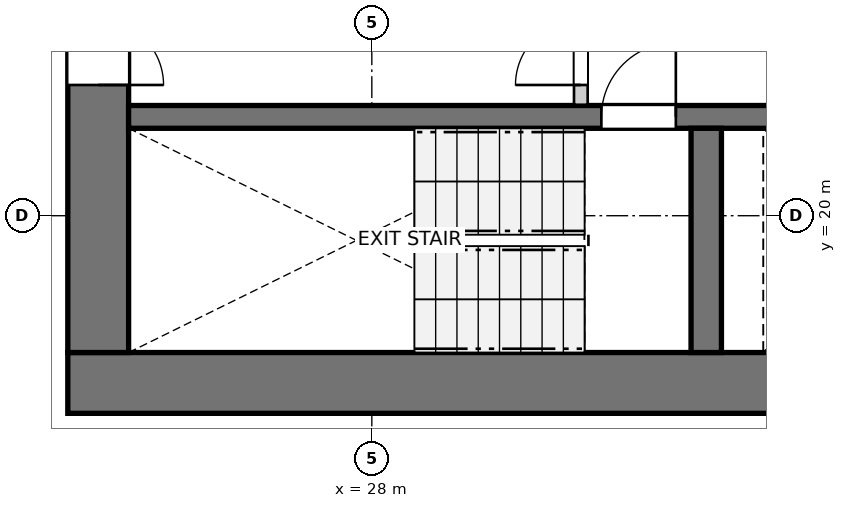
"""IFC4 building model, lengths in metres.
Left out: names, types, materials, properties, quantities, classifications, styles, units other than length and angle.
Written with IfcOpenShell. Run it as: python <this file> out.ifc"""

import sys

from ifc_helpers import new_model, si_unit, direction, frame, frame_2d, origin, place, context, subcontext, project, spatial, rectangle, extrude, source, transform, mapped, element, fill, save


model = new_model("IFC4")
c1 = context("Model", 3, precision=1e-05, world=origin(), true_north=direction((0.0, 1.0)))
c2 = subcontext(c1, "Body", "Model", "MODEL_VIEW")
j1 = project(units=[si_unit("LENGTHUNIT", "METRE"), si_unit("PLANEANGLEUNIT", "RADIAN")], contexts=[c1])
p1 = place(None, origin())
s1 = spatial("IfcSite", under=j1, at=p1, CompositionType="ELEMENT")
p2 = place(p1, origin())
s2 = spatial("IfcBuilding", under=s1, at=p2, CompositionType="ELEMENT")
p3 = place(p2, frame((0.0, 0.0, 14.2)))
s3 = spatial("IfcBuildingStorey", under=s2, at=p3, CompositionType="ELEMENT", Elevation=14.2)
p4 = place(p3, frame((24.0, 17.8, 0.0), z_axis=(0.0, 0.0, 1.0), x_axis=(1.0, 0.0, 0.0)))
e1 = element("IfcWall", 1, at=p4, inside=s3, PredefinedType="SHEAR", context=c2, shape_type="SweptSolid", body=[
    extrude(rectangle(XDim=12.7, YDim=0.8, at=frame_2d((6.35, 0.0))), origin(), (0.0, 0.0, 1.0), 2.94),
])
p5 = place(p3, frame((24.4, 33.8, 0.0), z_axis=(0.0, 0.0, 1.0), x_axis=(0.0, -1.0, 0.0)))
e2 = element("IfcWall", 2, at=p5, inside=s3, PredefinedType="SHEAR", context=c2, shape_type="SweptSolid", body=[
    extrude(rectangle(XDim=15.6, YDim=0.8, at=frame_2d((7.8, 0.0))), origin(), (0.0, 0.0, 1.0), 2.94),
])
p6 = place(p5, frame((7.05, 0.0, 0.0)))
e3 = element("IfcOpeningElement", 3, at=p6, cuts=e2, PredefinedType="OPENING", context=c2, shape_type="SweptSolid", body=[
    extrude(rectangle(XDim=1.5, YDim=2.15, at=frame_2d((0.75, 1.075))), frame((0.0, 0.41, 0.0), z_axis=(0.0, -1.0, 0.0), x_axis=(1.0, 0.0, 0.0)), (0.0, 0.0, 1.0), 0.82),
])
p7 = place(p5, frame((3.52, 0.0, 0.0)))
e4 = element("IfcOpeningElement", 4, at=p7, cuts=e2, PredefinedType="OPENING", context=c2, shape_type="SweptSolid", body=[
    extrude(rectangle(XDim=0.86, YDim=2.05, at=frame_2d((0.43, 1.025))), frame((0.0, 0.41, 0.0), z_axis=(0.0, -1.0, 0.0), x_axis=(1.0, 0.0, 0.0)), (0.0, 0.0, 1.0), 0.82),
])
p8 = place(p5, frame((11.22, 0.0, 0.0)))
e5 = element("IfcOpeningElement", 5, at=p8, cuts=e2, PredefinedType="OPENING", context=c2, shape_type="SweptSolid", body=[
    extrude(rectangle(XDim=0.86, YDim=2.05, at=frame_2d((0.43, 1.025))), frame((0.0, 0.41, 0.0), z_axis=(0.0, -1.0, 0.0), x_axis=(1.0, 0.0, 0.0)), (0.0, 0.0, 1.0), 0.82),
])
p9 = place(p3, frame((24.8, 21.3, 0.0), z_axis=(0.0, 0.0, 1.0), x_axis=(1.0, 0.0, 0.0)))
e6 = element("IfcWall", 6, at=p9, inside=s3, PredefinedType="SHEAR", context=c2, shape_type="SweptSolid", body=[
    extrude(rectangle(XDim=11.1, YDim=0.3, at=frame_2d((5.55, 0.0))), origin(), (0.0, 0.0, 1.0), 2.94),
])
p10 = place(p9, frame((6.22, 0.0, 0.0)))
e7 = element("IfcOpeningElement", 7, at=p10, cuts=e6, PredefinedType="OPENING", context=c2, shape_type="SweptSolid", body=[
    extrude(rectangle(XDim=0.98, YDim=2.15, at=frame_2d((0.49, 1.075))), frame((0.0, 0.16, 0.0), z_axis=(0.0, -1.0, 0.0), x_axis=(1.0, 0.0, 0.0)), (0.0, 0.0, 1.0), 0.32),
])
p11 = place(p9, frame((9.15, 0.0, 0.0)))
e8 = element("IfcOpeningElement", 8, at=p11, cuts=e6, PredefinedType="OPENING", context=c2, shape_type="SweptSolid", body=[
    extrude(rectangle(XDim=1.15, YDim=2.15, at=frame_2d((0.575, 1.075))), frame((0.0, 0.16, 0.0), z_axis=(0.0, -1.0, 0.0), x_axis=(1.0, 0.0, 0.0)), (0.0, 0.0, 1.0), 0.32),
])
p12 = place(p3, frame((32.4, 18.2, 0.0), z_axis=(0.0, 0.0, 1.0), x_axis=(0.0, 1.0, 0.0)))
e9 = element("IfcWall", 9, at=p12, inside=s3, PredefinedType="SHEAR", context=c2, shape_type="SweptSolid", body=[
    extrude(rectangle(XDim=2.95, YDim=0.4, at=frame_2d((1.475, 0.0))), origin(), (0.0, 0.0, 1.0), 2.94),
])
p13 = place(p3, frame((30.75, 21.46, 0.0), z_axis=(0.0, 0.0, 1.0), x_axis=(0.0, 1.0, 0.0)))
e10 = element("IfcWall", 10, at=p13, inside=s3, PredefinedType="PARTITIONING", context=c2, shape_type="SweptSolid", body=[
    extrude(rectangle(XDim=3.11, YDim=0.18, at=frame_2d((1.555, 0.0))), origin(), (0.0, 0.0, 1.0), 2.94),
])
p14 = place(p13, frame((0.26, 0.0, 0.0)))
e11 = element("IfcOpeningElement", 11, at=p14, cuts=e10, PredefinedType="OPENING", context=c2, shape_type="SweptSolid", body=[
    extrude(rectangle(XDim=0.86, YDim=2.05, at=frame_2d((0.43, 1.025))), frame((0.0, 0.1, 0.0), z_axis=(0.0, -1.0, 0.0), x_axis=(1.0, 0.0, 0.0)), (0.0, 0.0, 1.0), 0.2),
])
m1 = source(origin(), c2, "Body", "SweptSolid", [
    extrude(rectangle(XDim=0.98, YDim=2.15, at=frame_2d((0.49, 1.075))), frame((0.0, 0.025, 0.0), z_axis=(0.0, -1.0, 0.0), x_axis=(1.0, 0.0, 0.0)), (0.0, 0.0, 1.0), 0.05),
])
p15 = place(p10, origin())
e12 = element("IfcDoor", 12, at=p15, inside=s3, OperationType="SINGLE_SWING_RIGHT", PredefinedType="DOOR", context=c2, shape_type="MappedRepresentation", body=[
    mapped(m1, transform((0.0, 0.0, 0.0), x_axis=(1.0, 0.0, 0.0), y_axis=(0.0, 1.0, 0.0), z_axis=(0.0, 0.0, 1.0), scale=1.0)),
])
fill(e7, e12)
m2 = source(origin(), c2, "Body", "SweptSolid", [
    extrude(rectangle(XDim=0.86, YDim=2.05, at=frame_2d((0.43, 1.025))), frame((0.0, 0.025, 0.0), z_axis=(0.0, -1.0, 0.0), x_axis=(1.0, 0.0, 0.0)), (0.0, 0.0, 1.0), 0.05),
])
p16 = place(p8, origin())
e13 = element("IfcDoor", 13, at=p16, inside=s3, OperationType="SINGLE_SWING_RIGHT", PredefinedType="DOOR", context=c2, shape_type="MappedRepresentation", body=[
    mapped(m2, transform((0.0, 0.0, 0.0), x_axis=(1.0, 0.0, 0.0), y_axis=(0.0, 1.0, 0.0), z_axis=(0.0, 0.0, 1.0), scale=1.0)),
])
fill(e5, e13)
p17 = place(p14, origin())
e14 = element("IfcDoor", 14, at=p17, inside=s3, OperationType="SINGLE_SWING_LEFT", PredefinedType="DOOR", context=c2, shape_type="MappedRepresentation", body=[
    mapped(m2, transform((0.0, 0.0, 0.0), x_axis=(1.0, 0.0, 0.0), y_axis=(0.0, 1.0, 0.0), z_axis=(0.0, 0.0, 1.0), scale=1.0)),
])
fill(e11, e14)
save(model, sys.argv[1])
